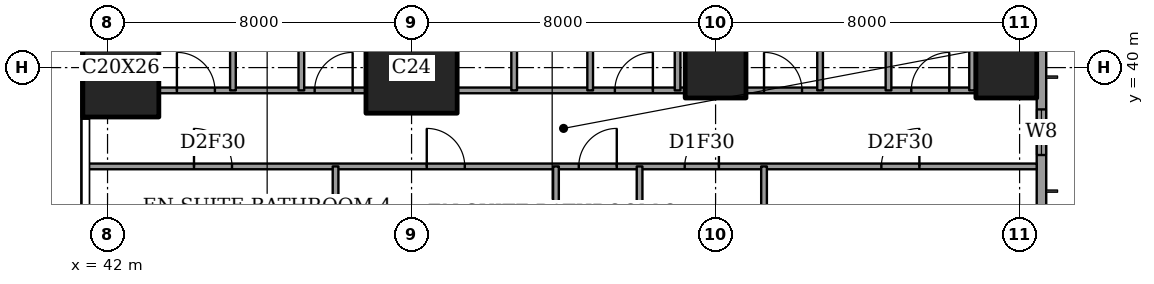
"""IFC4 building model, lengths in metres.
Left out: names, types, materials, properties, quantities, classifications, styles, units other than length and angle.
Written with IfcOpenShell. Run it as: python <this file> out.ifc"""

import sys

from ifc_helpers import new_model, si_unit, direction, frame, frame_2d, origin, origin_2d, place, context, subcontext, project, spatial, rectangle, extrude, element, fill, save


model = new_model("IFC4")
c1 = context("Model", 3, precision=1e-05, world=origin(), true_north=direction((0.0, 1.0)))
c2 = subcontext(c1, "Body", "Model", "MODEL_VIEW")
j1 = project(units=[si_unit("LENGTHUNIT", "METRE"), si_unit("PLANEANGLEUNIT", "RADIAN")], contexts=[c1])
p1 = place(None, origin())
s1 = spatial("IfcSite", under=j1, at=p1, CompositionType="ELEMENT")
p2 = place(p1, origin())
s2 = spatial("IfcBuilding", under=s1, at=p2, CompositionType="ELEMENT")
p3 = place(p2, frame((0.0, 0.0, 255.6)))
s3 = spatial("IfcBuildingStorey", under=s2, at=p3, CompositionType="ELEMENT", Elevation=255.6)
p4 = place(p3, frame((42.35, 40.0, 0.0), z_axis=(0.0, 0.0, 1.0), x_axis=(1.0, 0.0, 0.0)))
e1 = element("IfcColumn", 1, at=p4, inside=s3, PredefinedType="COLUMN", context=c2, shape_type="SweptSolid", body=[
    extrude(rectangle(XDim=2.0, YDim=2.6, at=origin_2d()), origin(), (0.0, 0.0, 1.0), 3.6),
])
p5 = place(p3, frame((50.0, 40.0, 0.0), z_axis=(0.0, 0.0, 1.0), x_axis=(1.0, 0.0, 0.0)))
e2 = element("IfcColumn", 2, at=p5, inside=s3, PredefinedType="COLUMN", context=c2, shape_type="SweptSolid", body=[
    extrude(rectangle(XDim=2.4, YDim=2.4, at=origin_2d()), origin(), (0.0, 0.0, 1.0), 3.6),
])
for number, where, z_axis, x_axis in (
    (3, (58.0, 40.0, 0.0), (0.0, 0.0, 1.0), (1.0, 0.0, 0.0)),
    (4, (65.65, 40.0, 0.0), (0.0, 0.0, 1.0), (1.0, 0.0, 0.0)),
):
    element("IfcColumn", number, at=place(p3, frame(where, z_axis=z_axis, x_axis=x_axis)), inside=s3, PredefinedType="COLUMN", context=c2, shape_type="SweptSolid", body=[
        extrude(rectangle(XDim=1.6, YDim=1.6, at=origin_2d()), origin(), (0.0, 0.0, 1.0), 3.6),
    ])
p6 = place(p3, frame((66.575, 3.175, 0.0), z_axis=(0.0, 0.0, 1.0), x_axis=(0.0, 1.0, 0.0)))
e5 = element("IfcWall", 5, at=p6, inside=s3, PredefinedType="SOLIDWALL", context=c2, shape_type="SweptSolid", body=[
    extrude(rectangle(XDim=41.65, YDim=0.25, at=frame_2d((20.825, 0.0))), origin(), (0.0, 0.0, 1.0), 3.6),
])
p7 = place(p6, frame((0.875, 0.0, 0.6)))
e6 = element("IfcOpeningElement", 6, at=p7, cuts=e5, PredefinedType="OPENING", context=c2, shape_type="SweptSolid", body=[
    extrude(rectangle(XDim=2.4, YDim=2.0, at=frame_2d((1.2, 1.0))), frame((0.0, 0.135, 0.0), z_axis=(0.0, -1.0, 0.0), x_axis=(1.0, 0.0, 0.0)), (0.0, 0.0, 1.0), 0.27),
])
p8 = place(p6, frame((6.6, 0.0, 0.6)))
e7 = element("IfcOpeningElement", 7, at=p8, cuts=e5, PredefinedType="OPENING", context=c2, shape_type="SweptSolid", body=[
    extrude(rectangle(XDim=1.2, YDim=2.0, at=frame_2d((0.6, 1.0))), frame((0.0, 0.135, 0.0), z_axis=(0.0, -1.0, 0.0), x_axis=(1.0, 0.0, 0.0)), (0.0, 0.0, 1.0), 0.27),
])
p9 = place(p6, frame((8.825, 0.0, 0.6)))
e8 = element("IfcOpeningElement", 8, at=p9, cuts=e5, PredefinedType="OPENING", context=c2, shape_type="SweptSolid", body=[
    extrude(rectangle(XDim=2.4, YDim=2.0, at=frame_2d((1.2, 1.0))), frame((0.0, 0.135, 0.0), z_axis=(0.0, -1.0, 0.0), x_axis=(1.0, 0.0, 0.0)), (0.0, 0.0, 1.0), 0.27),
])
p10 = place(p6, frame((15.725, 0.0, 0.6)))
e9 = element("IfcOpeningElement", 9, at=p10, cuts=e5, PredefinedType="OPENING", context=c2, shape_type="SweptSolid", body=[
    extrude(rectangle(XDim=2.4, YDim=2.0, at=frame_2d((1.2, 1.0))), frame((0.0, 0.135, 0.0), z_axis=(0.0, -1.0, 0.0), x_axis=(1.0, 0.0, 0.0)), (0.0, 0.0, 1.0), 0.27),
])
p11 = place(p6, frame((23.625, 0.0, 0.6)))
e10 = element("IfcOpeningElement", 10, at=p11, cuts=e5, PredefinedType="OPENING", context=c2, shape_type="SweptSolid", body=[
    extrude(rectangle(XDim=2.4, YDim=2.0, at=frame_2d((1.2, 1.0))), frame((0.0, 0.135, 0.0), z_axis=(0.0, -1.0, 0.0), x_axis=(1.0, 0.0, 0.0)), (0.0, 0.0, 1.0), 0.27),
])
p12 = place(p6, frame((30.725, 0.0, 0.6)))
e11 = element("IfcOpeningElement", 11, at=p12, cuts=e5, PredefinedType="OPENING", context=c2, shape_type="SweptSolid", body=[
    extrude(rectangle(XDim=2.4, YDim=2.0, at=frame_2d((1.2, 1.0))), frame((0.0, 0.135, 0.0), z_axis=(0.0, -1.0, 0.0), x_axis=(1.0, 0.0, 0.0)), (0.0, 0.0, 1.0), 0.27),
])
p13 = place(p6, frame((34.525, 0.0, 0.6)))
e12 = element("IfcOpeningElement", 12, at=p13, cuts=e5, PredefinedType="OPENING", context=c2, shape_type="SweptSolid", body=[
    extrude(rectangle(XDim=1.2, YDim=2.0, at=frame_2d((0.6, 1.0))), frame((0.0, 0.135, 0.0), z_axis=(0.0, -1.0, 0.0), x_axis=(1.0, 0.0, 0.0)), (0.0, 0.0, 1.0), 0.27),
])
p14 = place(p6, frame((38.375, 0.0, 0.6)))
e13 = element("IfcOpeningElement", 13, at=p14, cuts=e5, PredefinedType="OPENING", context=c2, shape_type="SweptSolid", body=[
    extrude(rectangle(XDim=2.4, YDim=2.0, at=frame_2d((1.2, 1.0))), frame((0.0, 0.135, 0.0), z_axis=(0.0, -1.0, 0.0), x_axis=(1.0, 0.0, 0.0)), (0.0, 0.0, 1.0), 0.27),
])
p15 = place(p3, frame((41.439, 37.4, 0.0), z_axis=(0.0, 0.0, 1.0), x_axis=(1.0, 0.0, 0.0)))
e14 = element("IfcWall", 14, at=p15, inside=s3, PredefinedType="PARTITIONING", context=c2, shape_type="SweptSolid", body=[
    extrude(rectangle(XDim=25.011, YDim=0.15, at=frame_2d((12.505, 0.0))), origin(), (0.0, 0.0, 1.0), 3.35),
])
p16 = place(p15, frame((12.961, 0.0, 0.0)))
e15 = element("IfcOpeningElement", 15, at=p16, cuts=e14, PredefinedType="OPENING", context=c2, shape_type="SweptSolid", body=[
    extrude(rectangle(XDim=1.0, YDim=2.1, at=frame_2d((0.5, 1.05))), frame((0.0, 0.085, 0.0), z_axis=(0.0, -1.0, 0.0), x_axis=(1.0, 0.0, 0.0)), (0.0, 0.0, 1.0), 0.17),
])
p17 = place(p15, frame((20.924, 0.0, 0.0)))
e16 = element("IfcOpeningElement", 16, at=p17, cuts=e14, PredefinedType="OPENING", context=c2, shape_type="SweptSolid", body=[
    extrude(rectangle(XDim=1.0, YDim=2.1, at=frame_2d((0.5, 1.05))), frame((0.0, 0.085, 0.0), z_axis=(0.0, -1.0, 0.0), x_axis=(1.0, 0.0, 0.0)), (0.0, 0.0, 1.0), 0.17),
])
p18 = place(p15, frame((15.749, 0.0, 0.0)))
e17 = element("IfcOpeningElement", 17, at=p18, cuts=e14, PredefinedType="OPENING", context=c2, shape_type="SweptSolid", body=[
    extrude(rectangle(XDim=0.9, YDim=2.1, at=frame_2d((0.45, 1.05))), frame((0.0, 0.085, 0.0), z_axis=(0.0, -1.0, 0.0), x_axis=(1.0, 0.0, 0.0)), (0.0, 0.0, 1.0), 0.17),
])
p19 = place(p15, frame((8.961, 0.0, 0.0)))
e18 = element("IfcOpeningElement", 18, at=p19, cuts=e14, PredefinedType="OPENING", context=c2, shape_type="SweptSolid", body=[
    extrude(rectangle(XDim=1.0, YDim=2.1, at=frame_2d((0.5, 1.05))), frame((0.0, 0.085, 0.0), z_axis=(0.0, -1.0, 0.0), x_axis=(1.0, 0.0, 0.0)), (0.0, 0.0, 1.0), 0.17),
])
p20 = place(p15, frame((2.836, 0.0, 0.0)))
e19 = element("IfcOpeningElement", 19, at=p20, cuts=e14, PredefinedType="OPENING", context=c2, shape_type="SweptSolid", body=[
    extrude(rectangle(XDim=1.0, YDim=2.1, at=frame_2d((0.5, 1.05))), frame((0.0, 0.085, 0.0), z_axis=(0.0, -1.0, 0.0), x_axis=(1.0, 0.0, 0.0)), (0.0, 0.0, 1.0), 0.17),
])
p21 = place(p3, frame((43.35, 39.4, 0.0), z_axis=(0.0, 0.0, 1.0), x_axis=(1.0, 0.0, 0.0)))
e20 = element("IfcWall", 20, at=p21, inside=s3, PredefinedType="PARTITIONING", context=c2, shape_type="SweptSolid", body=[
    extrude(rectangle(XDim=5.45, YDim=0.15, at=frame_2d((2.725, 0.0))), origin(), (0.0, 0.0, 1.0), 3.35),
])
p22 = place(p21, frame((4.1, 0.0, 0.0)))
e21 = element("IfcOpeningElement", 21, at=p22, cuts=e20, PredefinedType="OPENING", context=c2, shape_type="SweptSolid", body=[
    extrude(rectangle(XDim=1.0, YDim=2.1, at=frame_2d((0.5, 1.05))), frame((0.0, 0.085, 0.0), z_axis=(0.0, -1.0, 0.0), x_axis=(1.0, 0.0, 0.0)), (0.0, 0.0, 1.0), 0.17),
])
p23 = place(p21, frame((0.475, 0.0, 0.0)))
e22 = element("IfcOpeningElement", 22, at=p23, cuts=e20, PredefinedType="OPENING", context=c2, shape_type="SweptSolid", body=[
    extrude(rectangle(XDim=1.0, YDim=2.1, at=frame_2d((0.5, 1.05))), frame((0.0, 0.085, 0.0), z_axis=(0.0, -1.0, 0.0), x_axis=(1.0, 0.0, 0.0)), (0.0, 0.0, 1.0), 0.17),
])
p24 = place(p3, frame((51.2, 39.4, 0.0), z_axis=(0.0, 0.0, 1.0), x_axis=(1.0, 0.0, 0.0)))
e23 = element("IfcWall", 23, at=p24, inside=s3, PredefinedType="PARTITIONING", context=c2, shape_type="SweptSolid", body=[
    extrude(rectangle(XDim=6.0, YDim=0.15, at=frame_2d((3.0, 0.0))), origin(), (0.0, 0.0, 1.0), 3.35),
])
p25 = place(p24, frame((4.15, 0.0, 0.0)))
e24 = element("IfcOpeningElement", 24, at=p25, cuts=e23, PredefinedType="OPENING", context=c2, shape_type="SweptSolid", body=[
    extrude(rectangle(XDim=1.0, YDim=2.1, at=frame_2d((0.5, 1.05))), frame((0.0, 0.085, 0.0), z_axis=(0.0, -1.0, 0.0), x_axis=(1.0, 0.0, 0.0)), (0.0, 0.0, 1.0), 0.17),
])
p26 = place(p3, frame((58.8, 39.4, 0.0), z_axis=(0.0, 0.0, 1.0), x_axis=(1.0, 0.0, 0.0)))
e25 = element("IfcWall", 25, at=p26, inside=s3, PredefinedType="PARTITIONING", context=c2, shape_type="SweptSolid", body=[
    extrude(rectangle(XDim=6.05, YDim=0.15, at=frame_2d((3.025, 0.0))), origin(), (0.0, 0.0, 1.0), 3.35),
])
p27 = place(p26, frame((4.35, 0.0, 0.0)))
e26 = element("IfcOpeningElement", 26, at=p27, cuts=e25, PredefinedType="OPENING", context=c2, shape_type="SweptSolid", body=[
    extrude(rectangle(XDim=1.0, YDim=2.1, at=frame_2d((0.5, 1.05))), frame((0.0, 0.085, 0.0), z_axis=(0.0, -1.0, 0.0), x_axis=(1.0, 0.0, 0.0)), (0.0, 0.0, 1.0), 0.17),
])
p28 = place(p26, frame((0.475, 0.0, 0.0)))
e27 = element("IfcOpeningElement", 27, at=p28, cuts=e25, PredefinedType="OPENING", context=c2, shape_type="SweptSolid", body=[
    extrude(rectangle(XDim=1.0, YDim=2.1, at=frame_2d((0.5, 1.05))), frame((0.0, 0.085, 0.0), z_axis=(0.0, -1.0, 0.0), x_axis=(1.0, 0.0, 0.0)), (0.0, 0.0, 1.0), 0.17),
])
p29 = place(p3, frame((45.3, 39.4, 0.0), z_axis=(0.0, 0.0, 1.0), x_axis=(0.0, 1.0, 0.0)))
e28 = element("IfcWall", 28, at=p29, inside=s3, PredefinedType="PARTITIONING", context=c2, shape_type="SweptSolid", body=[
    extrude(rectangle(XDim=9.05, YDim=0.15, at=frame_2d((4.525, 0.0))), origin(), (0.0, 0.0, 1.0), 3.35),
])
p30 = place(p3, frame((47.1, 39.4, 0.0), z_axis=(0.0, 0.0, 1.0), x_axis=(0.0, 1.0, 0.0)))
e29 = element("IfcWall", 29, at=p30, inside=s3, PredefinedType="PARTITIONING", context=c2, shape_type="SweptSolid", body=[
    extrude(rectangle(XDim=3.5, YDim=0.15, at=frame_2d((1.75, 0.0))), origin(), (0.0, 0.0, 1.0), 3.35),
])
p31 = place(p30, frame((1.3, 0.0, 0.0)))
e30 = element("IfcOpeningElement", 30, at=p31, cuts=e29, PredefinedType="OPENING", context=c2, shape_type="SweptSolid", body=[
    extrude(rectangle(XDim=0.9, YDim=2.1, at=frame_2d((0.45, 1.05))), frame((0.0, 0.085, 0.0), z_axis=(0.0, -1.0, 0.0), x_axis=(1.0, 0.0, 0.0)), (0.0, 0.0, 1.0), 0.17),
])
p32 = place(p3, frame((48.0, 28.0, 0.0), z_axis=(0.0, 0.0, 1.0), x_axis=(0.0, 1.0, 0.0)))
e31 = element("IfcWall", 31, at=p32, inside=s3, PredefinedType="PARTITIONING", context=c2, shape_type="SweptSolid", body=[
    extrude(rectangle(XDim=9.4, YDim=0.15, at=frame_2d((4.7, 0.0))), origin(), (0.0, 0.0, 1.0), 3.35),
])
p33 = place(p32, frame((0.837, 0.0, 0.0)))
e32 = element("IfcOpeningElement", 32, at=p33, cuts=e31, PredefinedType="OPENING", context=c2, shape_type="SweptSolid", body=[
    extrude(rectangle(XDim=1.0, YDim=2.1, at=frame_2d((0.5, 1.05))), frame((0.0, 0.085, 0.0), z_axis=(0.0, -1.0, 0.0), x_axis=(1.0, 0.0, 0.0)), (0.0, 0.0, 1.0), 0.17),
])
p34 = place(p3, frame((52.7, 39.4, 0.0), z_axis=(0.0, 0.0, 1.0), x_axis=(0.0, 1.0, 0.0)))
e33 = element("IfcWall", 33, at=p34, inside=s3, PredefinedType="PARTITIONING", context=c2, shape_type="SweptSolid", body=[
    extrude(rectangle(XDim=9.05, YDim=0.15, at=frame_2d((4.525, 0.0))), origin(), (0.0, 0.0, 1.0), 3.35),
])
p35 = place(p34, frame((5.675, 0.0, 0.0)))
e34 = element("IfcOpeningElement", 34, at=p35, cuts=e33, PredefinedType="OPENING", context=c2, shape_type="SweptSolid", body=[
    extrude(rectangle(XDim=0.9, YDim=2.1, at=frame_2d((0.45, 1.05))), frame((0.0, 0.085, 0.0), z_axis=(0.0, -1.0, 0.0), x_axis=(1.0, 0.0, 0.0)), (0.0, 0.0, 1.0), 0.17),
])
p36 = place(p3, frame((53.8, 30.675, 0.0), z_axis=(0.0, 0.0, 1.0), x_axis=(0.0, 1.0, 0.0)))
e35 = element("IfcWall", 35, at=p36, inside=s3, PredefinedType="PARTITIONING", context=c2, shape_type="SweptSolid", body=[
    extrude(rectangle(XDim=6.725, YDim=0.15, at=frame_2d((3.362, 0.0))), origin(), (0.0, 0.0, 1.0), 3.35),
])
p37 = place(p3, frame((54.7, 39.4, 0.0), z_axis=(0.0, 0.0, 1.0), x_axis=(0.0, 1.0, 0.0)))
e36 = element("IfcWall", 36, at=p37, inside=s3, PredefinedType="PARTITIONING", context=c2, shape_type="SweptSolid", body=[
    extrude(rectangle(XDim=3.2, YDim=0.15, at=frame_2d((1.6, 0.0))), origin(), (0.0, 0.0, 1.0), 3.35),
])
p38 = place(p37, frame((1.15, 0.0, 0.0)))
e37 = element("IfcOpeningElement", 37, at=p38, cuts=e36, PredefinedType="OPENING", context=c2, shape_type="SweptSolid", body=[
    extrude(rectangle(XDim=0.9, YDim=2.1, at=frame_2d((0.45, 1.05))), frame((0.0, 0.085, 0.0), z_axis=(0.0, -1.0, 0.0), x_axis=(1.0, 0.0, 0.0)), (0.0, 0.0, 1.0), 0.17),
])
p39 = place(p3, frame((56.0, 28.0, 0.0), z_axis=(0.0, 0.0, 1.0), x_axis=(0.0, 1.0, 0.0)))
e38 = element("IfcWall", 38, at=p39, inside=s3, PredefinedType="PARTITIONING", context=c2, shape_type="SweptSolid", body=[
    extrude(rectangle(XDim=9.4, YDim=0.15, at=frame_2d((4.7, 0.0))), origin(), (0.0, 0.0, 1.0), 3.35),
])
p40 = place(p39, frame((0.837, 0.0, 0.0)))
e39 = element("IfcOpeningElement", 39, at=p40, cuts=e38, PredefinedType="OPENING", context=c2, shape_type="SweptSolid", body=[
    extrude(rectangle(XDim=1.0, YDim=2.1, at=frame_2d((0.5, 1.05))), frame((0.0, 0.085, 0.0), z_axis=(0.0, -1.0, 0.0), x_axis=(1.0, 0.0, 0.0)), (0.0, 0.0, 1.0), 0.17),
])
p41 = place(p3, frame((57.0, 39.4, 0.0), z_axis=(0.0, 0.0, 1.0), x_axis=(0.0, 1.0, 0.0)))
e40 = element("IfcWall", 40, at=p41, inside=s3, PredefinedType="PARTITIONING", context=c2, shape_type="SweptSolid", body=[
    extrude(rectangle(XDim=9.05, YDim=0.15, at=frame_2d((4.525, 0.0))), origin(), (0.0, 0.0, 1.0), 3.35),
])
p42 = place(p3, frame((59.275, 33.2, 0.0), z_axis=(0.0, 0.0, 1.0), x_axis=(0.0, 1.0, 0.0)))
e41 = element("IfcWall", 41, at=p42, inside=s3, PredefinedType="PARTITIONING", context=c2, shape_type="SweptSolid", body=[
    extrude(rectangle(XDim=4.2, YDim=0.15, at=frame_2d((2.1, 0.0))), origin(), (0.0, 0.0, 1.0), 3.35),
])
p43 = place(p3, frame((60.75, 39.4, 0.0), z_axis=(0.0, 0.0, 1.0), x_axis=(0.0, 1.0, 0.0)))
e42 = element("IfcWall", 42, at=p43, inside=s3, PredefinedType="PARTITIONING", context=c2, shape_type="SweptSolid", body=[
    extrude(rectangle(XDim=9.05, YDim=0.15, at=frame_2d((4.525, 0.0))), origin(), (0.0, 0.0, 1.0), 3.35),
])
p44 = place(p3, frame((62.55, 39.4, 0.0), z_axis=(0.0, 0.0, 1.0), x_axis=(0.0, 1.0, 0.0)))
e43 = element("IfcWall", 43, at=p44, inside=s3, PredefinedType="PARTITIONING", context=c2, shape_type="SweptSolid", body=[
    extrude(rectangle(XDim=3.5, YDim=0.15, at=frame_2d((1.75, 0.0))), origin(), (0.0, 0.0, 1.0), 3.35),
])
p45 = place(p44, frame((1.3, 0.0, 0.0)))
e44 = element("IfcOpeningElement", 44, at=p45, cuts=e43, PredefinedType="OPENING", context=c2, shape_type="SweptSolid", body=[
    extrude(rectangle(XDim=0.9, YDim=2.1, at=frame_2d((0.45, 1.05))), frame((0.0, 0.085, 0.0), z_axis=(0.0, -1.0, 0.0), x_axis=(1.0, 0.0, 0.0)), (0.0, 0.0, 1.0), 0.17),
])
p46 = place(p3, frame((64.75, 39.4, 0.0), z_axis=(0.0, 0.0, 1.0), x_axis=(0.0, 1.0, 0.0)))
e45 = element("IfcWall", 45, at=p46, inside=s3, PredefinedType="PARTITIONING", context=c2, shape_type="SweptSolid", body=[
    extrude(rectangle(XDim=5.3, YDim=0.15, at=frame_2d((2.65, 0.0))), origin(), (0.0, 0.0, 1.0), 3.35),
])
p47 = place(p46, frame((2.2, 0.0, 0.0)))
e46 = element("IfcOpeningElement", 46, at=p47, cuts=e45, PredefinedType="OPENING", context=c2, shape_type="SweptSolid", body=[
    extrude(rectangle(XDim=0.9, YDim=2.1, at=frame_2d((0.45, 1.05))), frame((0.0, 0.085, 0.0), z_axis=(0.0, -1.0, 0.0), x_axis=(1.0, 0.0, 0.0)), (0.0, 0.0, 1.0), 0.17),
])
p48 = place(p13, origin())
e47 = element("IfcWindow", 47, at=p48, inside=s3, PartitioningType="SINGLE_PANEL", PredefinedType="WINDOW", context=c2, shape_type="SweptSolid", body=[
    extrude(rectangle(XDim=1.2, YDim=2.0, at=frame_2d((0.6, 1.0))), frame((0.0, 0.03, 0.0), z_axis=(0.0, -1.0, 0.0), x_axis=(1.0, 0.0, 0.0)), (0.0, 0.0, 1.0), 0.06),
])
fill(e12, e47)
p49 = place(p27, origin())
e48 = element("IfcDoor", 48, at=p49, inside=s3, OperationType="SINGLE_SWING_LEFT", PredefinedType="DOOR", context=c2, shape_type="SweptSolid", body=[
    extrude(rectangle(XDim=1.0, YDim=2.1, at=frame_2d((0.5, 1.05))), frame((0.0, 0.025, 0.0), z_axis=(0.0, -1.0, 0.0), x_axis=(1.0, 0.0, 0.0)), (0.0, 0.0, 1.0), 0.05),
])
fill(e26, e48)
p50 = place(p28, origin())
e49 = element("IfcDoor", 49, at=p50, inside=s3, OperationType="SINGLE_SWING_RIGHT", PredefinedType="DOOR", context=c2, shape_type="SweptSolid", body=[
    extrude(rectangle(XDim=1.0, YDim=2.1, at=frame_2d((0.5, 1.05))), frame((0.0, 0.025, 0.0), z_axis=(0.0, -1.0, 0.0), x_axis=(1.0, 0.0, 0.0)), (0.0, 0.0, 1.0), 0.05),
])
fill(e27, e49)
p51 = place(p25, origin())
e50 = element("IfcDoor", 50, at=p51, inside=s3, OperationType="SINGLE_SWING_LEFT", PredefinedType="DOOR", context=c2, shape_type="SweptSolid", body=[
    extrude(rectangle(XDim=1.0, YDim=2.1, at=frame_2d((0.5, 1.05))), frame((0.0, 0.025, 0.0), z_axis=(0.0, -1.0, 0.0), x_axis=(1.0, 0.0, 0.0)), (0.0, 0.0, 1.0), 0.05),
])
fill(e24, e50)
p52 = place(p22, origin())
e51 = element("IfcDoor", 51, at=p52, inside=s3, OperationType="SINGLE_SWING_LEFT", PredefinedType="DOOR", context=c2, shape_type="SweptSolid", body=[
    extrude(rectangle(XDim=1.0, YDim=2.1, at=frame_2d((0.5, 1.05))), frame((0.0, 0.025, 0.0), z_axis=(0.0, -1.0, 0.0), x_axis=(1.0, 0.0, 0.0)), (0.0, 0.0, 1.0), 0.05),
])
fill(e21, e51)
p53 = place(p23, origin())
e52 = element("IfcDoor", 52, at=p53, inside=s3, OperationType="SINGLE_SWING_RIGHT", PredefinedType="DOOR", context=c2, shape_type="SweptSolid", body=[
    extrude(rectangle(XDim=1.0, YDim=2.1, at=frame_2d((0.5, 1.05))), frame((0.0, 0.025, 0.0), z_axis=(0.0, -1.0, 0.0), x_axis=(1.0, 0.0, 0.0)), (0.0, 0.0, 1.0), 0.05),
])
fill(e22, e52)
p54 = place(p16, origin())
e53 = element("IfcDoor", 53, at=p54, inside=s3, OperationType="SINGLE_SWING_LEFT", PredefinedType="DOOR", context=c2, shape_type="SweptSolid", body=[
    extrude(rectangle(XDim=1.0, YDim=2.1, at=frame_2d((0.5, 1.05))), frame((0.0, 0.025, 0.0), z_axis=(0.0, -1.0, 0.0), x_axis=(1.0, 0.0, 0.0)), (0.0, 0.0, 1.0), 0.05),
])
fill(e15, e53)
p55 = place(p17, origin())
e54 = element("IfcDoor", 54, at=p55, inside=s3, OperationType="SINGLE_SWING_LEFT", PredefinedType="DOOR", context=c2, shape_type="SweptSolid", body=[
    extrude(rectangle(XDim=1.0, YDim=2.1, at=frame_2d((0.5, 1.05))), frame((0.0, 0.025, 0.0), z_axis=(0.0, -1.0, 0.0), x_axis=(1.0, 0.0, 0.0)), (0.0, 0.0, 1.0), 0.05),
])
fill(e16, e54)
p56 = place(p18, origin())
e55 = element("IfcDoor", 55, at=p56, inside=s3, OperationType="SINGLE_SWING_LEFT", PredefinedType="DOOR", context=c2, shape_type="SweptSolid", body=[
    extrude(rectangle(XDim=0.9, YDim=2.1, at=frame_2d((0.45, 1.05))), frame((0.0, 0.025, 0.0), z_axis=(0.0, -1.0, 0.0), x_axis=(1.0, 0.0, 0.0)), (0.0, 0.0, 1.0), 0.05),
])
fill(e17, e55)
p57 = place(p19, origin())
e56 = element("IfcDoor", 56, at=p57, inside=s3, OperationType="SINGLE_SWING_RIGHT", PredefinedType="DOOR", context=c2, shape_type="SweptSolid", body=[
    extrude(rectangle(XDim=1.0, YDim=2.1, at=frame_2d((0.5, 1.05))), frame((0.0, 0.025, 0.0), z_axis=(0.0, -1.0, 0.0), x_axis=(1.0, 0.0, 0.0)), (0.0, 0.0, 1.0), 0.05),
])
fill(e18, e56)
p58 = place(p20, origin())
e57 = element("IfcDoor", 57, at=p58, inside=s3, OperationType="SINGLE_SWING_RIGHT", PredefinedType="DOOR", context=c2, shape_type="SweptSolid", body=[
    extrude(rectangle(XDim=1.0, YDim=2.1, at=frame_2d((0.5, 1.05))), frame((0.0, 0.025, 0.0), z_axis=(0.0, -1.0, 0.0), x_axis=(1.0, 0.0, 0.0)), (0.0, 0.0, 1.0), 0.05),
])
fill(e19, e57)
save(model, sys.argv[1])
